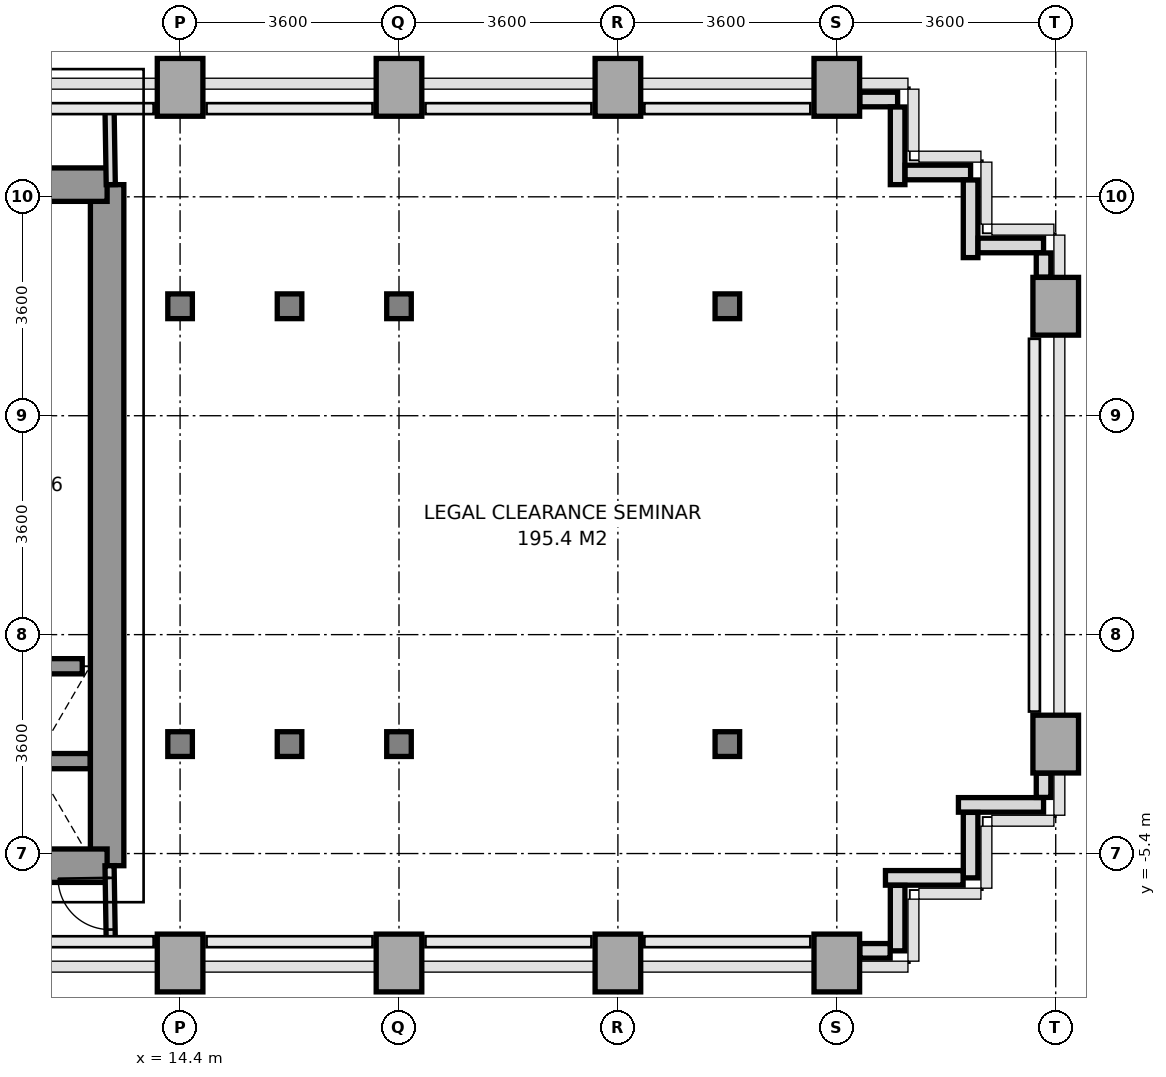
"""IFC4 building model, lengths in metres.
Left out: names, types, materials, properties, quantities, classifications, styles, units other than length and angle.
Written with IfcOpenShell. Run it as: python <this file> out.ifc"""

import sys

from ifc_helpers import new_model, si_unit, direction, frame, frame_2d, origin, origin_2d, place, context, subcontext, project, spatial, rectangle, i_section, extrude, source, transform, mapped, element, fill, save


model = new_model("IFC4")
c1 = context("Model", 3, precision=1e-05, world=origin(), true_north=direction((0.0, 1.0)))
c2 = subcontext(c1, "Body", "Model", "MODEL_VIEW")
j1 = project(units=[si_unit("LENGTHUNIT", "METRE"), si_unit("PLANEANGLEUNIT", "RADIAN")], contexts=[c1])
p1 = place(None, origin())
s1 = spatial("IfcSite", under=j1, at=p1, CompositionType="ELEMENT")
p2 = place(p1, origin())
s2 = spatial("IfcBuilding", under=s1, at=p2, CompositionType="ELEMENT")
p3 = place(p2, frame((0.0, 0.0, 68.0)))
s3 = spatial("IfcBuildingStorey", under=s2, at=p3, CompositionType="ELEMENT", Elevation=68.0)
m1 = source(origin(), c2, "Body", "SweptSolid", [
    extrude(rectangle(XDim=0.75, YDim=0.95, at=origin_2d()), origin(), (0.0, 0.0, 1.0), 3.2),
])
p4 = place(p3, frame((14.4, -7.2, 0.0), z_axis=(0.0, 0.0, 1.0), x_axis=(1.0, 0.0, 0.0)))
e1 = element("IfcColumn", 1, at=p4, inside=s3, PredefinedType="COLUMN", context=c2, shape_type="MappedRepresentation", body=[
    mapped(m1, transform((0.0, 0.0, 0.0), x_axis=(1.0, 0.0, 0.0), y_axis=(0.0, 1.0, 0.0), z_axis=(0.0, 0.0, 1.0), scale=1.0)),
])
m2 = source(origin(), c2, "Body", "SweptSolid", [
    extrude(i_section(OverallWidth=0.404, OverallDepth=0.407, WebThickness=0.022, FlangeThickness=0.035, at=origin_2d()), origin(), (0.0, 0.0, 1.0), 3.2),
])
for number, where, z_axis, x_axis in (
    (2, (14.4, -3.6, 0.0), (0.0, 0.0, 1.0), (1.0, 0.0, 0.0)),
    (3, (14.4, 3.6, 0.0), (0.0, 0.0, 1.0), (1.0, 0.0, 0.0)),
):
    element("IfcColumn", number, at=place(p3, frame(where, z_axis=z_axis, x_axis=x_axis)), inside=s3, PredefinedType="COLUMN", context=c2, shape_type="MappedRepresentation", body=[
        mapped(m2, transform((0.0, 0.0, 0.0), x_axis=(1.0, 0.0, 0.0), y_axis=(0.0, 1.0, 0.0), z_axis=(0.0, 0.0, 1.0), scale=1.0)),
    ])
p5 = place(p3, frame((14.4, 7.2, 0.0), z_axis=(0.0, 0.0, 1.0), x_axis=(1.0, 0.0, 0.0)))
e4 = element("IfcColumn", 4, at=p5, inside=s3, PredefinedType="COLUMN", context=c2, shape_type="MappedRepresentation", body=[
    mapped(m1, transform((0.0, 0.0, 0.0), x_axis=(1.0, 0.0, 0.0), y_axis=(0.0, 1.0, 0.0), z_axis=(0.0, 0.0, 1.0), scale=1.0)),
])
for number, where, z_axis, x_axis in (
    (5, (16.2, -3.6, 0.0), (0.0, 0.0, 1.0), (1.0, 0.0, 0.0)),
    (6, (16.2, 3.6, 0.0), (0.0, 0.0, 1.0), (1.0, 0.0, 0.0)),
):
    element("IfcColumn", number, at=place(p3, frame(where, z_axis=z_axis, x_axis=x_axis)), inside=s3, PredefinedType="COLUMN", context=c2, shape_type="MappedRepresentation", body=[
        mapped(m2, transform((0.0, 0.0, 0.0), x_axis=(1.0, 0.0, 0.0), y_axis=(0.0, 1.0, 0.0), z_axis=(0.0, 0.0, 1.0), scale=1.0)),
    ])
p6 = place(p3, frame((18.0, -7.2, 0.0), z_axis=(0.0, 0.0, 1.0), x_axis=(1.0, 0.0, 0.0)))
e7 = element("IfcColumn", 7, at=p6, inside=s3, PredefinedType="COLUMN", context=c2, shape_type="MappedRepresentation", body=[
    mapped(m1, transform((0.0, 0.0, 0.0), x_axis=(1.0, 0.0, 0.0), y_axis=(0.0, 1.0, 0.0), z_axis=(0.0, 0.0, 1.0), scale=1.0)),
])
for number, where, z_axis, x_axis in (
    (8, (18.0, -3.6, 0.0), (0.0, 0.0, 1.0), (1.0, 0.0, 0.0)),
    (9, (18.0, 3.6, 0.0), (0.0, 0.0, 1.0), (1.0, 0.0, 0.0)),
):
    element("IfcColumn", number, at=place(p3, frame(where, z_axis=z_axis, x_axis=x_axis)), inside=s3, PredefinedType="COLUMN", context=c2, shape_type="MappedRepresentation", body=[
        mapped(m2, transform((0.0, 0.0, 0.0), x_axis=(1.0, 0.0, 0.0), y_axis=(0.0, 1.0, 0.0), z_axis=(0.0, 0.0, 1.0), scale=1.0)),
    ])
for number, where, z_axis, x_axis in (
    (10, (18.0, 7.2, 0.0), (0.0, 0.0, 1.0), (1.0, 0.0, 0.0)),
    (11, (21.6, -7.2, 0.0), (0.0, 0.0, 1.0), (1.0, 0.0, 0.0)),
    (12, (21.6, 7.2, 0.0), (0.0, 0.0, 1.0), (1.0, 0.0, 0.0)),
):
    element("IfcColumn", number, at=place(p3, frame(where, z_axis=z_axis, x_axis=x_axis)), inside=s3, PredefinedType="COLUMN", context=c2, shape_type="MappedRepresentation", body=[
        mapped(m1, transform((0.0, 0.0, 0.0), x_axis=(1.0, 0.0, 0.0), y_axis=(0.0, 1.0, 0.0), z_axis=(0.0, 0.0, 1.0), scale=1.0)),
    ])
for number, where, z_axis, x_axis in (
    (13, (23.4, -3.6, 0.0), (0.0, 0.0, 1.0), (1.0, 0.0, 0.0)),
    (14, (23.4, 3.6, 0.0), (0.0, 0.0, 1.0), (1.0, 0.0, 0.0)),
):
    element("IfcColumn", number, at=place(p3, frame(where, z_axis=z_axis, x_axis=x_axis)), inside=s3, PredefinedType="COLUMN", context=c2, shape_type="MappedRepresentation", body=[
        mapped(m2, transform((0.0, 0.0, 0.0), x_axis=(1.0, 0.0, 0.0), y_axis=(0.0, 1.0, 0.0), z_axis=(0.0, 0.0, 1.0), scale=1.0)),
    ])
for number, where, z_axis, x_axis in (
    (15, (25.2, -7.2, 0.0), (0.0, 0.0, 1.0), (1.0, 0.0, 0.0)),
    (16, (25.2, 7.2, 0.0), (0.0, 0.0, 1.0), (1.0, 0.0, 0.0)),
    (17, (28.8, -3.6, 0.0), (0.0, 0.0, 1.0), (1.0, 0.0, 0.0)),
    (18, (28.8, 3.6, 0.0), (0.0, 0.0, 1.0), (1.0, 0.0, 0.0)),
):
    element("IfcColumn", number, at=place(p3, frame(where, z_axis=z_axis, x_axis=x_axis)), inside=s3, PredefinedType="COLUMN", context=c2, shape_type="MappedRepresentation", body=[
        mapped(m1, transform((0.0, 0.0, 0.0), x_axis=(1.0, 0.0, 0.0), y_axis=(0.0, 1.0, 0.0), z_axis=(0.0, 0.0, 1.0), scale=1.0)),
    ])
p7 = place(p3, frame((28.6, -4.6, 0.0), z_axis=(0.0, 0.0, 1.0), x_axis=(-1.0, 0.0, 0.0)))
e19 = element("IfcWall", 19, at=p7, inside=s3, PredefinedType="PARAPET", context=c2, shape_type="SweptSolid", body=[
    extrude(rectangle(XDim=1.4, YDim=0.24, at=frame_2d((0.7, 0.0))), origin(), (0.0, 0.0, 1.0), 1.15),
])
p8 = place(p3, frame((27.4, -4.723, 0.0), z_axis=(0.0, 0.0, 1.0), x_axis=(0.0, -1.0, 0.0)))
e20 = element("IfcWall", 20, at=p8, inside=s3, PredefinedType="PARAPET", context=c2, shape_type="SweptSolid", body=[
    extrude(rectangle(XDim=1.077, YDim=0.24, at=frame_2d((0.539, 0.0))), origin(), (0.0, 0.0, 1.0), 1.15),
])
p9 = place(p3, frame((27.277, -5.8, 0.0), z_axis=(0.0, 0.0, 1.0), x_axis=(-1.0, 0.0, 0.0)))
e21 = element("IfcWall", 21, at=p9, inside=s3, PredefinedType="PARAPET", context=c2, shape_type="SweptSolid", body=[
    extrude(rectangle(XDim=1.277, YDim=0.24, at=frame_2d((0.639, 0.0))), origin(), (0.0, 0.0, 1.0), 1.15),
])
p10 = place(p3, frame((26.2, -5.923, 0.0), z_axis=(0.0, 0.0, 1.0), x_axis=(0.0, -1.0, 0.0)))
e22 = element("IfcWall", 22, at=p10, inside=s3, PredefinedType="PARAPET", context=c2, shape_type="SweptSolid", body=[
    extrude(rectangle(XDim=1.077, YDim=0.24, at=frame_2d((0.539, 0.0))), origin(), (0.0, 0.0, 1.0), 1.15),
])
p11 = place(p3, frame((26.077, -7.0, 0.0), z_axis=(0.0, 0.0, 1.0), x_axis=(-1.0, 0.0, 0.0)))
e23 = element("IfcWall", 23, at=p11, inside=s3, PredefinedType="PARAPET", context=c2, shape_type="SweptSolid", body=[
    extrude(rectangle(XDim=0.499, YDim=0.24, at=frame_2d((0.25, 0.0))), origin(), (0.0, 0.0, 1.0), 1.15),
])
p12 = place(p3, frame((25.578, 7.0, 0.0), z_axis=(0.0, 0.0, 1.0), x_axis=(1.0, 0.0, 0.0)))
e24 = element("IfcWall", 24, at=p12, inside=s3, PredefinedType="PARAPET", context=c2, shape_type="SweptSolid", body=[
    extrude(rectangle(XDim=0.622, YDim=0.24, at=frame_2d((0.311, 0.0))), origin(), (0.0, 0.0, 1.0), 1.15),
])
p13 = place(p3, frame((26.2, 6.877, 0.0), z_axis=(0.0, 0.0, 1.0), x_axis=(0.0, -1.0, 0.0)))
e25 = element("IfcWall", 25, at=p13, inside=s3, PredefinedType="PARAPET", context=c2, shape_type="SweptSolid", body=[
    extrude(rectangle(XDim=1.277, YDim=0.24, at=frame_2d((0.638, 0.0))), origin(), (0.0, 0.0, 1.0), 1.15),
])
p14 = place(p3, frame((26.323, 5.8, 0.0), z_axis=(0.0, 0.0, 1.0), x_axis=(1.0, 0.0, 0.0)))
e26 = element("IfcWall", 26, at=p14, inside=s3, PredefinedType="PARAPET", context=c2, shape_type="SweptSolid", body=[
    extrude(rectangle(XDim=1.077, YDim=0.24, at=frame_2d((0.539, 0.0))), origin(), (0.0, 0.0, 1.0), 1.15),
])
p15 = place(p3, frame((27.4, 5.677, 0.0), z_axis=(0.0, 0.0, 1.0), x_axis=(0.0, -1.0, 0.0)))
e27 = element("IfcWall", 27, at=p15, inside=s3, PredefinedType="PARAPET", context=c2, shape_type="SweptSolid", body=[
    extrude(rectangle(XDim=1.277, YDim=0.24, at=frame_2d((0.639, 0.0))), origin(), (0.0, 0.0, 1.0), 1.15),
])
p16 = place(p3, frame((27.523, 4.6, 0.0), z_axis=(0.0, 0.0, 1.0), x_axis=(1.0, 0.0, 0.0)))
e28 = element("IfcWall", 28, at=p16, inside=s3, PredefinedType="PARAPET", context=c2, shape_type="SweptSolid", body=[
    extrude(rectangle(XDim=1.077, YDim=0.24, at=frame_2d((0.539, 0.0))), origin(), (0.0, 0.0, 1.0), 1.15),
])
for number, where, z_axis, x_axis in (
    (29, (28.6, 4.477, 0.0), (0.0, 0.0, 1.0), (0.0, -1.0, 0.0)),
    (30, (28.6, -4.078, 0.0), (0.0, 0.0, 1.0), (0.0, -1.0, 0.0)),
):
    element("IfcWall", number, at=place(p3, frame(where, z_axis=z_axis, x_axis=x_axis)), inside=s3, PredefinedType="PARAPET", context=c2, shape_type="SweptSolid", body=[
        extrude(rectangle(XDim=0.399, YDim=0.24, at=frame_2d((0.2, 0.0))), origin(), (0.0, 0.0, 1.0), 1.15),
    ])
p17 = place(p3, frame((13.2, -5.6, 0.0), z_axis=(0.0, 0.0, 1.0), x_axis=(0.0, 1.0, 0.0)))
e31 = element("IfcWall", 31, at=p17, inside=s3, PredefinedType="SHEAR", context=c2, shape_type="SweptSolid", body=[
    extrude(rectangle(XDim=11.2, YDim=0.55, at=frame_2d((5.6, 0.0))), origin(), (0.0, 0.0, 1.0), 3.2),
])
p18 = place(p3, frame((11.381, 5.6, 0.0), z_axis=(0.0, 0.0, 1.0), x_axis=(1.0, 0.0, 0.0)))
e32 = element("IfcWall", 32, at=p18, inside=s3, PredefinedType="SHEAR", context=c2, shape_type="SweptSolid", body=[
    extrude(rectangle(XDim=1.819, YDim=0.55, at=frame_2d((0.909, 0.0))), origin(), (0.0, 0.0, 1.0), 3.2),
])
p19 = place(p3, frame((5.4, -5.6, 0.0), z_axis=(0.0, 0.0, 1.0), x_axis=(1.0, 0.0, 0.0)))
e33 = element("IfcWall", 33, at=p19, inside=s3, PredefinedType="SHEAR", context=c2, shape_type="SweptSolid", body=[
    extrude(rectangle(XDim=7.8, YDim=0.55, at=frame_2d((3.9, 0.0))), origin(), (0.0, 0.0, 1.0), 3.2),
])
p20 = place(p19, frame((3.0, 0.0, 0.0)))
e34 = element("IfcOpeningElement", 34, at=p20, cuts=e33, PredefinedType="OPENING", context=c2, shape_type="SweptSolid", body=[
    extrude(rectangle(XDim=1.2, YDim=2.2, at=frame_2d((0.6, 1.1))), frame((0.0, 0.285, 0.0), z_axis=(0.0, -1.0, 0.0), x_axis=(1.0, 0.0, 0.0)), (0.0, 0.0, 1.0), 0.57),
])
p21 = place(p3, frame((11.08, -3.88, 0.0), z_axis=(0.0, 0.0, 1.0), x_axis=(1.0, 0.0, 0.0)))
e35 = element("IfcWall", 35, at=p21, inside=s3, PredefinedType="SOLIDWALL", context=c2, shape_type="SweptSolid", body=[
    extrude(rectangle(XDim=1.84, YDim=0.25, at=frame_2d((0.92, 0.0))), origin(), (0.0, 0.0, 1.0), 3.2),
])
p22 = place(p3, frame((11.209, -2.32, 0.0), z_axis=(0.0, 0.0, 1.0), x_axis=(1.0, 0.0, 0.0)))
e36 = element("IfcWall", 36, at=p22, inside=s3, PredefinedType="SOLIDWALL", context=c2, shape_type="SweptSolid", body=[
    extrude(rectangle(XDim=1.582, YDim=0.25, at=frame_2d((0.791, 0.0))), origin(), (0.0, 0.0, 1.0), 3.2),
])
p23 = place(p3, frame((13.26, 5.6, 0.0), z_axis=(0.0, 0.0, 1.0), x_axis=(-0.016013571389, 0.999871774545, 0.0)))
e37 = element("IfcWall", 37, at=p23, inside=s3, PredefinedType="PARTITIONING", context=c2, shape_type="SweptSolid", body=[
    extrude(rectangle(XDim=1.25, YDim=0.15, at=frame_2d((0.625, 0.0))), origin(), (0.0, 0.0, 1.0), 3.2),
])
p24 = place(p3, frame((13.26, -6.85, 0.0), z_axis=(0.0, 0.0, 1.0), x_axis=(-0.016013571389, 0.999871774545, 0.0)))
e38 = element("IfcWall", 38, at=p24, inside=s3, PredefinedType="PARTITIONING", context=c2, shape_type="SweptSolid", body=[
    extrude(rectangle(XDim=1.25, YDim=0.15, at=frame_2d((0.625, 0.0))), origin(), (0.0, 0.0, 1.0), 3.2),
])
p25 = place(p24, frame((0.2, 0.0, 0.0)))
e39 = element("IfcOpeningElement", 39, at=p25, cuts=e38, PredefinedType="OPENING", context=c2, shape_type="SweptSolid", body=[
    extrude(rectangle(XDim=0.85, YDim=2.1, at=frame_2d((0.425, 1.05))), frame((0.0, 0.085, 0.0), z_axis=(0.0, -1.0, 0.0), x_axis=(1.0, 0.0, 0.0)), (0.0, 0.0, 1.0), 0.17),
])
m3 = source(origin(), c2, "Body", "SweptSolid", [
    extrude(rectangle(XDim=0.85, YDim=2.1, at=frame_2d((0.425, 1.05))), frame((0.0, 0.025, 0.0), z_axis=(0.0, -1.0, 0.0), x_axis=(1.0, 0.0, 0.0)), (0.0, 0.0, 1.0), 0.05),
])
p26 = place(p25, origin())
e40 = element("IfcDoor", 40, at=p26, inside=s3, OperationType="SINGLE_SWING_RIGHT", PredefinedType="DOOR", context=c2, shape_type="MappedRepresentation", body=[
    mapped(m3, transform((0.0, 0.0, 0.0), x_axis=(1.0, 0.0, 0.0), y_axis=(0.0, 1.0, 0.0), z_axis=(0.0, 0.0, 1.0), scale=1.0)),
])
fill(e39, e40)
save(model, sys.argv[1])
